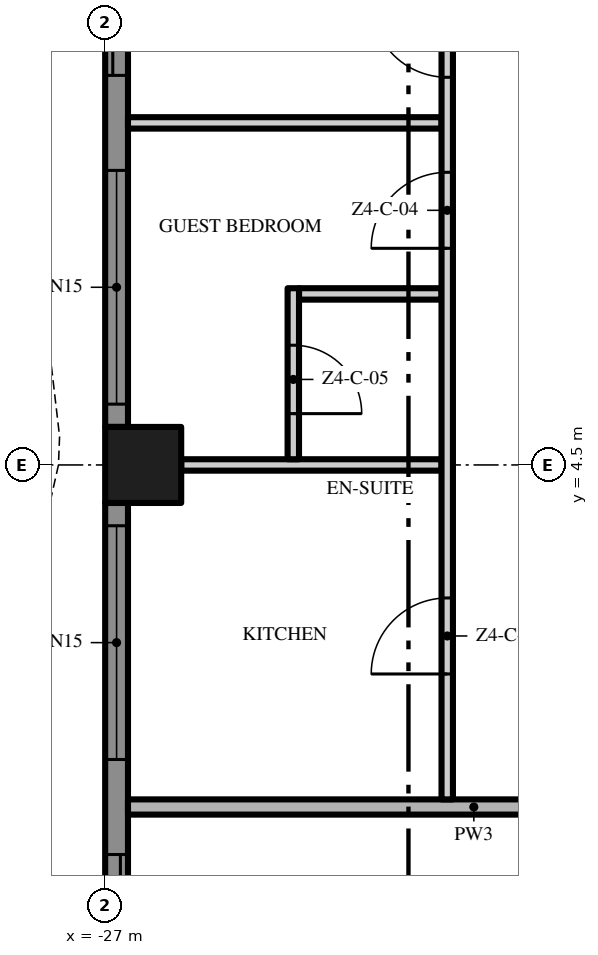
"""IFC4 building model, lengths in metres.
Left out: names, types, materials, properties, quantities, classifications, styles, units other than length and angle.
Written with IfcOpenShell. Run it as: python <this file> out.ifc"""

import sys

from ifc_helpers import new_model, si_unit, direction, frame, frame_2d, origin, origin_2d, place, context, subcontext, project, spatial, polyline, rectangle, outline, extrude, element, fill, save


model = new_model("IFC4")
c1 = context("Model", 3, precision=1e-05, world=origin(), true_north=direction((0.0, 1.0)))
c2 = subcontext(c1, "Body", "Model", "MODEL_VIEW")
j1 = project(units=[si_unit("LENGTHUNIT", "METRE"), si_unit("PLANEANGLEUNIT", "RADIAN")], contexts=[c1])
p1 = place(None, origin())
s1 = spatial("IfcSite", under=j1, at=p1, CompositionType="ELEMENT")
p2 = place(p1, origin())
s2 = spatial("IfcBuilding", under=s1, at=p2, CompositionType="ELEMENT")
p3 = place(p2, frame((0.0, 0.0, 207.2)))
s3 = spatial("IfcBuildingStorey", under=s2, at=p3, CompositionType="ELEMENT", Elevation=207.2)
p4 = place(p3, frame((-26.5, 4.5, 0.0), z_axis=(0.0, 0.0, 1.0), x_axis=(1.0, 0.0, 0.0)))
e1 = element("IfcColumn", 1, at=p4, inside=s3, PredefinedType="COLUMN", context=c2, shape_type="SweptSolid", body=[
    extrude(rectangle(XDim=1.0, YDim=1.0, at=origin_2d()), origin(), (0.0, 0.0, 1.0), 3.5),
])
p5 = place(p3, frame((-26.85, 5.0, 0.0), z_axis=(0.0, 0.0, 1.0), x_axis=(0.0, 1.0, 0.0)))
e2 = element("IfcWall", 2, at=p5, inside=s3, PredefinedType="SOLIDWALL", context=c2, shape_type="SweptSolid", body=[
    extrude(rectangle(XDim=8.0, YDim=0.3, at=frame_2d((4.0, 0.0))), origin(), (0.0, 0.0, 1.0), 3.5),
])
p6 = place(p5, frame((4.625, 0.0, 0.0)))
e3 = element("IfcOpeningElement", 3, at=p6, cuts=e2, PredefinedType="OPENING", context=c2, shape_type="SweptSolid", body=[
    extrude(rectangle(XDim=3.075, YDim=2.4, at=frame_2d((1.538, 1.2))), frame((0.0, 0.16, 0.0), z_axis=(0.0, -1.0, 0.0), x_axis=(1.0, 0.0, 0.0)), (0.0, 0.0, 1.0), 0.32),
])
p7 = place(p5, frame((0.3, 0.0, 0.45)))
e4 = element("IfcOpeningElement", 4, at=p7, cuts=e2, PredefinedType="OPENING", context=c2, shape_type="SweptSolid", body=[
    extrude(rectangle(XDim=3.075, YDim=2.65, at=frame_2d((1.538, 1.325))), frame((0.0, 0.16, 0.0), z_axis=(0.0, -1.0, 0.0), x_axis=(1.0, 0.0, 0.0)), (0.0, 0.0, 1.0), 0.32),
])
p8 = place(p3, frame((-26.85, -4.0, 0.0), z_axis=(0.0, 0.0, 1.0), x_axis=(0.0, 1.0, 0.0)))
e5 = element("IfcWall", 5, at=p8, inside=s3, PredefinedType="SOLIDWALL", context=c2, shape_type="SweptSolid", body=[
    extrude(rectangle(XDim=8.0, YDim=0.3, at=frame_2d((4.0, 0.0))), origin(), (0.0, 0.0, 1.0), 3.5),
])
p9 = place(p8, frame((4.625, 0.0, 0.45)))
e6 = element("IfcOpeningElement", 6, at=p9, cuts=e5, PredefinedType="OPENING", context=c2, shape_type="SweptSolid", body=[
    extrude(rectangle(XDim=3.075, YDim=2.65, at=frame_2d((1.538, 1.325))), frame((0.0, 0.16, 0.0), z_axis=(0.0, -1.0, 0.0), x_axis=(1.0, 0.0, 0.0)), (0.0, 0.0, 1.0), 0.32),
])
p10 = place(p8, frame((0.3, 0.0, 0.0)))
e7 = element("IfcOpeningElement", 7, at=p10, cuts=e5, PredefinedType="OPENING", context=c2, shape_type="SweptSolid", body=[
    extrude(rectangle(XDim=3.075, YDim=2.4, at=frame_2d((1.538, 1.2))), frame((0.0, 0.16, 0.0), z_axis=(0.0, -1.0, 0.0), x_axis=(1.0, 0.0, 0.0)), (0.0, 0.0, 1.0), 0.32),
])
p11 = place(p3, origin())
e8 = element("IfcWall", 8, at=p11, inside=s3, PredefinedType="USERDEFINED", context=c2, shape_type="SweptSolid", body=[
    extrude(outline(polyline([(-27.951, 18.0), (-28.612, 16.5), (-29.345, 15.0), (-29.869, 13.5), (-30.0, 12.375), (-29.985, 12.0), (-29.649, 10.5), (-28.988, 9.0), (-28.255, 7.5), (-27.731, 6.0), (-27.6, 4.875), (-27.615, 4.5), (-27.951, 3.0), (-28.612, 1.5), (-29.345, 0.0), (-29.869, -1.5), (-30.0, -2.625), (-29.985, -3.0), (-29.649, -4.5), (-28.988, -6.0), (-28.255, -7.5), (-27.731, -9.0), (-27.6, -10.125), (-27.615, -10.5), (-27.951, -12.0), (-28.612, -13.5), (-29.345, -15.0), (-29.869, -16.5), (-30.0, -17.625), (-29.985, -18.0), (-29.735, -17.99), (-29.749, -17.635), (-29.624, -16.556), (-29.114, -15.096), (-28.385, -13.605), (-27.713, -12.079), (-27.366, -10.533), (-27.349, -10.115), (-27.486, -8.944), (-28.024, -7.404), (-28.761, -5.895), (-29.41, -4.421), (-29.736, -2.967), (-29.749, -2.635), (-29.624, -1.556), (-29.114, -0.096), (-28.385, 1.395), (-27.713, 2.921), (-27.366, 4.467), (-27.349, 4.885), (-27.486, 6.056), (-28.024, 7.596), (-28.761, 9.105), (-29.41, 10.579), (-29.736, 12.033), (-29.749, 12.365), (-29.624, 13.444), (-29.114, 14.904), (-28.385, 16.395), (-27.723, 17.899), (-27.951, 18.0)])), origin(), (0.0, 0.0, 1.0), 0.9),
])
p12 = place(p3, frame((-26.7, 0.0, 0.0), z_axis=(0.0, 0.0, 1.0), x_axis=(1.0, 0.0, 0.0)))
e9 = element("IfcWall", 9, at=p12, inside=s3, PredefinedType="PARTITIONING", context=c2, shape_type="SweptSolid", body=[
    extrude(rectangle(XDim=9.1, YDim=0.2, at=frame_2d((4.55, 0.0))), origin(), (0.0, 0.0, 1.0), 3.5),
])
p13 = place(p3, frame((-26.0, 4.5, 0.0), z_axis=(0.0, 0.0, 1.0), x_axis=(1.0, 0.0, 0.0)))
e10 = element("IfcWall", 10, at=p13, inside=s3, PredefinedType="PARTITIONING", context=c2, shape_type="SweptSolid", body=[
    extrude(rectangle(XDim=3.425, YDim=0.15, at=frame_2d((1.712, 0.0))), origin(), (0.0, 0.0, 1.0), 3.5),
])
p14 = place(p3, frame((-24.45, 6.75, 0.0), z_axis=(0.0, 0.0, 1.0), x_axis=(1.0, 0.0, 0.0)))
e11 = element("IfcWall", 11, at=p14, inside=s3, PredefinedType="PARTITIONING", context=c2, shape_type="SweptSolid", body=[
    extrude(rectangle(XDim=1.875, YDim=0.15, at=frame_2d((0.938, 0.0))), origin(), (0.0, 0.0, 1.0), 3.5),
])
p15 = place(p3, frame((-26.7, 9.0, 0.0), z_axis=(0.0, 0.0, 1.0), x_axis=(1.0, 0.0, 0.0)))
e12 = element("IfcWall", 12, at=p15, inside=s3, PredefinedType="PARTITIONING", context=c2, shape_type="SweptSolid", body=[
    extrude(rectangle(XDim=4.125, YDim=0.15, at=frame_2d((2.062, 0.0))), origin(), (0.0, 0.0, 1.0), 3.5),
])
p16 = place(p3, frame((-24.525, 6.825, 0.0), z_axis=(0.0, 0.0, 1.0), x_axis=(0.0, -1.0, 0.0)))
e13 = element("IfcWall", 13, at=p16, inside=s3, PredefinedType="PARTITIONING", context=c2, shape_type="SweptSolid", body=[
    extrude(rectangle(XDim=2.25, YDim=0.15, at=frame_2d((1.125, 0.0))), origin(), (0.0, 0.0, 1.0), 3.5),
])
p17 = place(p16, frame((0.75, 0.0, 0.0)))
e14 = element("IfcOpeningElement", 14, at=p17, cuts=e13, PredefinedType="OPENING", context=c2, shape_type="SweptSolid", body=[
    extrude(rectangle(XDim=0.9, YDim=2.1, at=frame_2d((0.45, 1.05))), frame((0.0, 0.085, 0.0), z_axis=(0.0, -1.0, 0.0), x_axis=(1.0, 0.0, 0.0)), (0.0, 0.0, 1.0), 0.17),
])
p18 = place(p3, frame((-22.5, 0.1, 0.0), z_axis=(0.0, 0.0, 1.0), x_axis=(0.0, 1.0, 0.0)))
e15 = element("IfcWall", 15, at=p18, inside=s3, PredefinedType="PARTITIONING", context=c2, shape_type="SweptSolid", body=[
    extrude(rectangle(XDim=17.4, YDim=0.15, at=frame_2d((8.7, 0.0))), origin(), (0.0, 0.0, 1.0), 3.5),
])
p19 = place(p18, frame((1.65, 0.0, 0.0)))
e16 = element("IfcOpeningElement", 16, at=p19, cuts=e15, PredefinedType="OPENING", context=c2, shape_type="SweptSolid", body=[
    extrude(rectangle(XDim=1.0, YDim=2.4, at=frame_2d((0.5, 1.2))), frame((0.0, 0.085, 0.0), z_axis=(0.0, -1.0, 0.0), x_axis=(1.0, 0.0, 0.0)), (0.0, 0.0, 1.0), 0.17),
])
p20 = place(p18, frame((7.25, 0.0, 0.0)))
e17 = element("IfcOpeningElement", 17, at=p20, cuts=e15, PredefinedType="OPENING", context=c2, shape_type="SweptSolid", body=[
    extrude(rectangle(XDim=1.0, YDim=2.4, at=frame_2d((0.5, 1.2))), frame((0.0, 0.085, 0.0), z_axis=(0.0, -1.0, 0.0), x_axis=(1.0, 0.0, 0.0)), (0.0, 0.0, 1.0), 0.17),
])
p21 = place(p18, frame((9.5, 0.0, 0.0)))
e18 = element("IfcOpeningElement", 18, at=p21, cuts=e15, PredefinedType="OPENING", context=c2, shape_type="SweptSolid", body=[
    extrude(rectangle(XDim=1.0, YDim=2.4, at=frame_2d((0.5, 1.2))), frame((0.0, 0.085, 0.0), z_axis=(0.0, -1.0, 0.0), x_axis=(1.0, 0.0, 0.0)), (0.0, 0.0, 1.0), 0.17),
])
p22 = place(p18, frame((16.25, 0.0, 0.0)))
e19 = element("IfcOpeningElement", 19, at=p22, cuts=e15, PredefinedType="OPENING", context=c2, shape_type="SweptSolid", body=[
    extrude(rectangle(XDim=1.0, YDim=2.4, at=frame_2d((0.5, 1.2))), frame((0.0, 0.085, 0.0), z_axis=(0.0, -1.0, 0.0), x_axis=(1.0, 0.0, 0.0)), (0.0, 0.0, 1.0), 0.17),
])
p23 = place(p6, origin())
e20 = element("IfcDoor", 20, at=p23, inside=s3, OperationType="SINGLE_SWING_LEFT", PredefinedType="DOOR", context=c2, shape_type="SweptSolid", body=[
    extrude(rectangle(XDim=3.075, YDim=2.4, at=frame_2d((1.538, 1.2))), frame((0.0, 0.025, 0.0), z_axis=(0.0, -1.0, 0.0), x_axis=(1.0, 0.0, 0.0)), (0.0, 0.0, 1.0), 0.05),
])
fill(e3, e20)
p24 = place(p7, origin())
e21 = element("IfcWindow", 21, at=p24, inside=s3, PartitioningType="SINGLE_PANEL", PredefinedType="WINDOW", context=c2, shape_type="SweptSolid", body=[
    extrude(rectangle(XDim=3.075, YDim=2.65, at=frame_2d((1.538, 1.325))), frame((0.0, 0.03, 0.0), z_axis=(0.0, -1.0, 0.0), x_axis=(1.0, 0.0, 0.0)), (0.0, 0.0, 1.0), 0.06),
])
fill(e4, e21)
p25 = place(p9, origin())
e22 = element("IfcWindow", 22, at=p25, inside=s3, PartitioningType="SINGLE_PANEL", PredefinedType="WINDOW", context=c2, shape_type="SweptSolid", body=[
    extrude(rectangle(XDim=3.075, YDim=2.65, at=frame_2d((1.538, 1.325))), frame((0.0, 0.03, 0.0), z_axis=(0.0, -1.0, 0.0), x_axis=(1.0, 0.0, 0.0)), (0.0, 0.0, 1.0), 0.06),
])
fill(e6, e22)
p26 = place(p10, origin())
e23 = element("IfcDoor", 23, at=p26, inside=s3, OperationType="SINGLE_SWING_LEFT", PredefinedType="DOOR", context=c2, shape_type="SweptSolid", body=[
    extrude(rectangle(XDim=3.075, YDim=2.4, at=frame_2d((1.538, 1.2))), frame((0.0, 0.025, 0.0), z_axis=(0.0, -1.0, 0.0), x_axis=(1.0, 0.0, 0.0)), (0.0, 0.0, 1.0), 0.05),
])
fill(e7, e23)
p27 = place(p19, origin())
e24 = element("IfcDoor", 24, at=p27, inside=s3, OperationType="SINGLE_SWING_LEFT", PredefinedType="DOOR", context=c2, shape_type="SweptSolid", body=[
    extrude(rectangle(XDim=1.0, YDim=2.4, at=frame_2d((0.5, 1.2))), frame((0.0, 0.025, 0.0), z_axis=(0.0, -1.0, 0.0), x_axis=(1.0, 0.0, 0.0)), (0.0, 0.0, 1.0), 0.05),
])
fill(e16, e24)
p28 = place(p20, origin())
e25 = element("IfcDoor", 25, at=p28, inside=s3, OperationType="SINGLE_SWING_LEFT", PredefinedType="DOOR", context=c2, shape_type="SweptSolid", body=[
    extrude(rectangle(XDim=1.0, YDim=2.4, at=frame_2d((0.5, 1.2))), frame((0.0, 0.025, 0.0), z_axis=(0.0, -1.0, 0.0), x_axis=(1.0, 0.0, 0.0)), (0.0, 0.0, 1.0), 0.05),
])
fill(e17, e25)
p29 = place(p17, origin())
e26 = element("IfcDoor", 26, at=p29, inside=s3, OperationType="SINGLE_SWING_RIGHT", PredefinedType="DOOR", context=c2, shape_type="SweptSolid", body=[
    extrude(rectangle(XDim=0.9, YDim=2.1, at=frame_2d((0.45, 1.05))), frame((0.0, 0.025, 0.0), z_axis=(0.0, -1.0, 0.0), x_axis=(1.0, 0.0, 0.0)), (0.0, 0.0, 1.0), 0.05),
])
fill(e14, e26)
p30 = place(p21, origin())
e27 = element("IfcDoor", 27, at=p30, inside=s3, OperationType="SINGLE_SWING_RIGHT", PredefinedType="DOOR", context=c2, shape_type="SweptSolid", body=[
    extrude(rectangle(XDim=1.0, YDim=2.4, at=frame_2d((0.5, 1.2))), frame((0.0, 0.025, 0.0), z_axis=(0.0, -1.0, 0.0), x_axis=(1.0, 0.0, 0.0)), (0.0, 0.0, 1.0), 0.05),
])
fill(e18, e27)
save(model, sys.argv[1])
